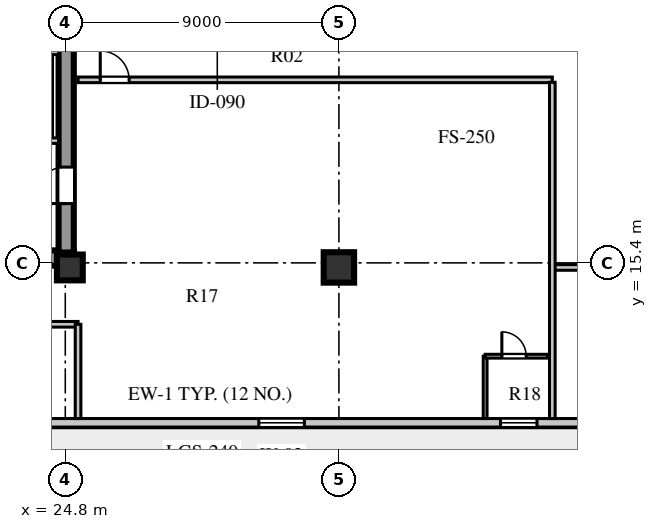
"""IFC4 building model, lengths in metres.
Left out: names, types, materials, properties, quantities, classifications, styles, units other than length and angle.
Written with IfcOpenShell. Run it as: python <this file> out.ifc"""

import sys

from ifc_helpers import new_model, si_unit, direction, frame, frame_2d, origin, origin_2d, place, context, subcontext, project, spatial, rectangle, extrude, element, fill, save


model = new_model("IFC4")
c1 = context("Model", 3, precision=1e-05, world=origin(), true_north=direction((0.0, 1.0)))
c2 = subcontext(c1, "Body", "Model", "MODEL_VIEW")
j1 = project(units=[si_unit("LENGTHUNIT", "METRE"), si_unit("PLANEANGLEUNIT", "RADIAN")], contexts=[c1])
p1 = place(None, origin())
s1 = spatial("IfcSite", under=j1, at=p1, CompositionType="ELEMENT")
p2 = place(p1, origin())
s2 = spatial("IfcBuilding", under=s1, at=p2, CompositionType="ELEMENT")
p3 = place(p2, frame((0.0, 0.0, 150.2)))
s3 = spatial("IfcBuildingStorey", under=s2, at=p3, CompositionType="ELEMENT", Elevation=150.2)
p4 = place(p3, frame((15.4, 15.56, 0.0), z_axis=(0.0, 0.0, 1.0), x_axis=(1.0, 0.0, 0.0)))
e1 = element("IfcWall", 1, at=p4, inside=s3, PredefinedType="SHEAR", context=c2, shape_type="SweptSolid", body=[
    extrude(rectangle(XDim=9.68, YDim=0.5, at=frame_2d((4.84, 0.0))), origin(), (0.0, 0.0, 1.0), 3.55),
])
p5 = place(p3, frame((24.83, 15.74, 0.0), z_axis=(0.0, 0.0, 1.0), x_axis=(0.0, 1.0, 0.0)))
e2 = element("IfcWall", 2, at=p5, inside=s3, PredefinedType="SHEAR", context=c2, shape_type="SweptSolid", body=[
    extrude(rectangle(XDim=25.76, YDim=0.5, at=frame_2d((12.88, 0.0))), origin(), (0.0, 0.0, 1.0), 3.55),
])
p6 = place(p5, frame((1.61, 0.0, 0.0)))
e3 = element("IfcOpeningElement", 3, at=p6, cuts=e2, PredefinedType="OPENING", context=c2, shape_type="SweptSolid", body=[
    extrude(rectangle(XDim=1.2, YDim=2.1, at=frame_2d((0.6, 1.05))), frame((0.0, 0.26, 0.0), z_axis=(0.0, -1.0, 0.0), x_axis=(1.0, 0.0, 0.0)), (0.0, 0.0, 1.0), 0.52),
])
p7 = place(p5, frame((6.78, 0.0, 0.0)))
e4 = element("IfcOpeningElement", 4, at=p7, cuts=e2, PredefinedType="OPENING", context=c2, shape_type="SweptSolid", body=[
    extrude(rectangle(XDim=0.85, YDim=2.06, at=frame_2d((0.425, 1.03))), frame((0.0, 0.26, 0.0), z_axis=(0.0, -1.0, 0.0), x_axis=(1.0, 0.0, 0.0)), (0.0, 0.0, 1.0), 0.52),
])
p8 = place(p5, frame((12.11, 0.0, 0.0)))
e5 = element("IfcOpeningElement", 5, at=p8, cuts=e2, PredefinedType="OPENING", context=c2, shape_type="SweptSolid", body=[
    extrude(rectangle(XDim=1.5, YDim=2.12, at=frame_2d((0.75, 1.06))), frame((0.0, 0.26, 0.0), z_axis=(0.0, -1.0, 0.0), x_axis=(1.0, 0.0, 0.0)), (0.0, 0.0, 1.0), 0.52),
])
p9 = place(p5, frame((20.11, 0.0, 0.0)))
e6 = element("IfcOpeningElement", 6, at=p9, cuts=e2, PredefinedType="OPENING", context=c2, shape_type="SweptSolid", body=[
    extrude(rectangle(XDim=1.2, YDim=2.12, at=frame_2d((0.6, 1.06))), frame((0.0, 0.26, 0.0), z_axis=(0.0, -1.0, 0.0), x_axis=(1.0, 0.0, 0.0)), (0.0, 0.0, 1.0), 0.52),
])
p10 = place(p5, frame((24.01, 0.0, 0.0)))
e7 = element("IfcOpeningElement", 7, at=p10, cuts=e2, PredefinedType="OPENING", context=c2, shape_type="SweptSolid", body=[
    extrude(rectangle(XDim=0.95, YDim=2.1, at=frame_2d((0.475, 1.05))), frame((0.0, 0.26, 0.0), z_axis=(0.0, -1.0, 0.0), x_axis=(1.0, 0.0, 0.0)), (0.0, 0.0, 1.0), 0.52),
])
p11 = place(p3, frame((24.95, 15.25, 0.0), z_axis=(0.0, 0.0, 1.0), x_axis=(1.0, 0.0, 0.0)))
e8 = element("IfcColumn", 8, at=p11, inside=s3, PredefinedType="COLUMN", context=c2, shape_type="SweptSolid", body=[
    extrude(rectangle(XDim=0.85, YDim=0.85, at=origin_2d()), origin(), (0.0, 0.0, 1.0), 3.55),
])
p12 = place(p3, frame((33.8, 15.25, 0.0), z_axis=(0.0, 0.0, 1.0), x_axis=(1.0, 0.0, 0.0)))
e9 = element("IfcColumn", 9, at=p12, inside=s3, PredefinedType="COLUMN", context=c2, shape_type="SweptSolid", body=[
    extrude(rectangle(XDim=1.0, YDim=1.0, at=origin_2d()), origin(), (0.0, 0.0, 1.0), 3.55),
])
p13 = place(p3, frame((13.25, 10.14, 0.0), z_axis=(0.0, 0.0, 1.0), x_axis=(1.0, 0.0, 0.0)))
e10 = element("IfcWall", 10, at=p13, inside=s3, PredefinedType="STANDARD", context=c2, shape_type="SweptSolid", body=[
    extrude(rectangle(XDim=32.1, YDim=0.28, at=frame_2d((16.05, 0.0))), origin(), (0.0, 0.0, 1.0), 3.55),
])
p14 = place(p13, frame((0.95, 0.0, 0.0)))
e11 = element("IfcOpeningElement", 11, at=p14, cuts=e10, PredefinedType="OPENING", context=c2, shape_type="SweptSolid", body=[
    extrude(rectangle(XDim=1.0, YDim=2.05, at=frame_2d((0.5, 1.025))), frame((0.0, 0.15, 0.0), z_axis=(0.0, -1.0, 0.0), x_axis=(1.0, 0.0, 0.0)), (0.0, 0.0, 1.0), 0.3),
])
p15 = place(p13, frame((6.03, 0.0, 0.8)))
e12 = element("IfcOpeningElement", 12, at=p15, cuts=e10, PredefinedType="OPENING", context=c2, shape_type="SweptSolid", body=[
    extrude(rectangle(XDim=1.8, YDim=2.0, at=frame_2d((0.9, 1.0))), frame((0.0, 0.15, 0.0), z_axis=(0.0, -1.0, 0.0), x_axis=(1.0, 0.0, 0.0)), (0.0, 0.0, 1.0), 0.3),
])
p16 = place(p13, frame((17.915, 0.0, 0.8)))
e13 = element("IfcOpeningElement", 13, at=p16, cuts=e10, PredefinedType="OPENING", context=c2, shape_type="SweptSolid", body=[
    extrude(rectangle(XDim=1.5, YDim=2.0, at=frame_2d((0.75, 1.0))), frame((0.0, 0.15, 0.0), z_axis=(0.0, -1.0, 0.0), x_axis=(1.0, 0.0, 0.0)), (0.0, 0.0, 1.0), 0.3),
])
p17 = place(p13, frame((25.865, 0.0, 0.8)))
e14 = element("IfcOpeningElement", 14, at=p17, cuts=e10, PredefinedType="OPENING", context=c2, shape_type="SweptSolid", body=[
    extrude(rectangle(XDim=1.2, YDim=1.75, at=frame_2d((0.6, 0.875))), frame((0.0, 0.15, 0.0), z_axis=(0.0, -1.0, 0.0), x_axis=(1.0, 0.0, 0.0)), (0.0, 0.0, 1.0), 0.3),
])
p18 = place(p13, frame((28.58, 0.0, 0.8)))
e15 = element("IfcOpeningElement", 15, at=p18, cuts=e10, PredefinedType="OPENING", context=c2, shape_type="SweptSolid", body=[
    extrude(rectangle(XDim=2.4, YDim=2.05, at=frame_2d((1.2, 1.025))), frame((0.0, 0.15, 0.0), z_axis=(0.0, -1.0, 0.0), x_axis=(1.0, 0.0, 0.0)), (0.0, 0.0, 1.0), 0.3),
])
p19 = place(p3, frame((19.64, 19.42, 0.0), z_axis=(0.0, 0.0, 1.0), x_axis=(1.0, 0.0, 0.0)))
e16 = element("IfcWall", 16, at=p19, inside=s3, PredefinedType="SOLIDWALL", context=c2, shape_type="SweptSolid", body=[
    extrude(rectangle(XDim=4.94, YDim=0.18, at=frame_2d((2.47, 0.0))), origin(), (0.0, 0.0, 1.0), 3.55),
])
p20 = place(p19, frame((0.72, 0.0, 0.0)))
e17 = element("IfcOpeningElement", 17, at=p20, cuts=e16, PredefinedType="OPENING", context=c2, shape_type="SweptSolid", body=[
    extrude(rectangle(XDim=1.1, YDim=2.1, at=frame_2d((0.55, 1.05))), frame((0.0, 0.1, 0.0), z_axis=(0.0, -1.0, 0.0), x_axis=(1.0, 0.0, 0.0)), (0.0, 0.0, 1.0), 0.2),
])
p21 = place(p19, frame((3.02, 0.0, 0.0)))
e18 = element("IfcOpeningElement", 18, at=p21, cuts=e16, PredefinedType="OPENING", context=c2, shape_type="SweptSolid", body=[
    extrude(rectangle(XDim=1.1, YDim=2.1, at=frame_2d((0.55, 1.05))), frame((0.0, 0.1, 0.0), z_axis=(0.0, -1.0, 0.0), x_axis=(1.0, 0.0, 0.0)), (0.0, 0.0, 1.0), 0.2),
])
p22 = place(p3, frame((19.64, 22.34, 0.0), z_axis=(0.0, 0.0, 1.0), x_axis=(1.0, 0.0, 0.0)))
e19 = element("IfcWall", 19, at=p22, inside=s3, PredefinedType="SOLIDWALL", context=c2, shape_type="SweptSolid", body=[
    extrude(rectangle(XDim=4.94, YDim=0.18, at=frame_2d((2.47, 0.0))), origin(), (0.0, 0.0, 1.0), 3.55),
])
p23 = place(p3, frame((25.22, 21.42, 0.0), z_axis=(0.0, 0.0, 1.0), x_axis=(1.0, 0.0, 0.0)))
e20 = element("IfcWall", 20, at=p23, inside=s3, PredefinedType="SOLIDWALL", context=c2, shape_type="SweptSolid", body=[
    extrude(rectangle(XDim=15.6, YDim=0.185, at=frame_2d((7.8, 0.0))), origin(), (0.0, 0.0, 1.0), 3.15),
])
p24 = place(p23, frame((0.73, 0.0, 0.0)))
e21 = element("IfcOpeningElement", 21, at=p24, cuts=e20, PredefinedType="OPENING", context=c2, shape_type="SweptSolid", body=[
    extrude(rectangle(XDim=0.95, YDim=2.1, at=frame_2d((0.475, 1.05))), frame((0.0, 0.103, 0.0), z_axis=(0.0, -1.0, 0.0), x_axis=(1.0, 0.0, 0.0)), (0.0, 0.0, 1.0), 0.205),
])
p25 = place(p3, frame((40.82, 15.25, 0.0), z_axis=(0.0, 0.0, 1.0), x_axis=(1.0, 0.0, 0.0)))
e22 = element("IfcWall", 22, at=p25, inside=s3, PredefinedType="SOLIDWALL", context=c2, shape_type="SweptSolid", body=[
    extrude(rectangle(XDim=7.3, YDim=0.185, at=frame_2d((3.65, 0.0))), origin(), (0.0, 0.0, 1.0), 2.9),
])
p26 = place(p3, frame((13.59, 13.38, 0.0), z_axis=(0.0, 0.0, 1.0), x_axis=(1.0, 0.0, 0.0)))
e23 = element("IfcWall", 23, at=p26, inside=s3, PredefinedType="SOLIDWALL", context=c2, shape_type="SweptSolid", body=[
    extrude(rectangle(XDim=11.63, YDim=0.185, at=frame_2d((5.815, 0.0))), origin(), (0.0, 0.0, 1.0), 3.55),
])
p27 = place(p26, frame((4.56, 0.0, 0.0)))
e24 = element("IfcOpeningElement", 24, at=p27, cuts=e23, PredefinedType="OPENING", context=c2, shape_type="SweptSolid", body=[
    extrude(rectangle(XDim=1.0, YDim=2.08, at=frame_2d((0.5, 1.04))), frame((0.0, 0.103, 0.0), z_axis=(0.0, -1.0, 0.0), x_axis=(1.0, 0.0, 0.0)), (0.0, 0.0, 1.0), 0.205),
])
p28 = place(p3, frame((25.22, 10.28, 0.0), z_axis=(0.0, 0.0, 1.0), x_axis=(0.0, 1.0, 0.0)))
e25 = element("IfcWall", 25, at=p28, inside=s3, PredefinedType="SOLIDWALL", context=c2, shape_type="SweptSolid", body=[
    extrude(rectangle(XDim=3.1, YDim=0.185, at=frame_2d((1.55, 0.0))), origin(), (0.0, 0.0, 1.0), 3.05),
])
p29 = place(p3, frame((40.82, 10.28, 0.0), z_axis=(0.0, 0.0, 1.0), x_axis=(0.0, 1.0, 0.0)))
e26 = element("IfcWall", 26, at=p29, inside=s3, PredefinedType="SOLIDWALL", context=c2, shape_type="SweptSolid", body=[
    extrude(rectangle(XDim=11.06, YDim=0.185, at=frame_2d((5.53, 0.0))), origin(), (0.0, 0.0, 1.0), 3.55),
])
p30 = place(p3, frame((38.61, 10.28, 0.0), z_axis=(0.0, 0.0, 1.0), x_axis=(0.0, 1.0, 0.0)))
e27 = element("IfcWall", 27, at=p30, inside=s3, PredefinedType="PLUMBINGWALL", context=c2, shape_type="SweptSolid", body=[
    extrude(rectangle(XDim=2.05, YDim=0.125, at=frame_2d((1.025, 0.0))), origin(), (0.0, 0.0, 1.0), 3.55),
])
p31 = place(p3, frame((38.61, 12.33, 0.0), z_axis=(0.0, 0.0, 1.0), x_axis=(1.0, 0.0, 0.0)))
e28 = element("IfcWall", 28, at=p31, inside=s3, PredefinedType="PLUMBINGWALL", context=c2, shape_type="SweptSolid", body=[
    extrude(rectangle(XDim=2.05, YDim=0.125, at=frame_2d((1.025, 0.0))), origin(), (0.0, 0.0, 1.0), 3.55),
])
p32 = place(p31, frame((0.55, 0.0, 0.0)))
e29 = element("IfcOpeningElement", 29, at=p32, cuts=e28, PredefinedType="OPENING", context=c2, shape_type="SweptSolid", body=[
    extrude(rectangle(XDim=0.8, YDim=2.05, at=frame_2d((0.4, 1.025))), frame((0.0, 0.073, 0.0), z_axis=(0.0, -1.0, 0.0), x_axis=(1.0, 0.0, 0.0)), (0.0, 0.0, 1.0), 0.145),
])
p33 = place(p16, origin())
e30 = element("IfcWindow", 30, at=p33, inside=s3, PartitioningType="SINGLE_PANEL", PredefinedType="WINDOW", context=c2, shape_type="SweptSolid", body=[
    extrude(rectangle(XDim=1.5, YDim=2.0, at=frame_2d((0.75, 1.0))), frame((0.0, 0.03, 0.0), z_axis=(0.0, -1.0, 0.0), x_axis=(1.0, 0.0, 0.0)), (0.0, 0.0, 1.0), 0.06),
])
fill(e13, e30)
p34 = place(p17, origin())
e31 = element("IfcWindow", 31, at=p34, inside=s3, PartitioningType="SINGLE_PANEL", PredefinedType="WINDOW", context=c2, shape_type="SweptSolid", body=[
    extrude(rectangle(XDim=1.2, YDim=1.75, at=frame_2d((0.6, 0.875))), frame((0.0, 0.03, 0.0), z_axis=(0.0, -1.0, 0.0), x_axis=(1.0, 0.0, 0.0)), (0.0, 0.0, 1.0), 0.06),
])
fill(e14, e31)
p35 = place(p6, frame((1.2, 0.0, 0.0), z_axis=(0.0, 0.0, 1.0), x_axis=(-1.0, 0.0, 0.0)))
e32 = element("IfcDoor", 32, at=p35, inside=s3, OperationType="SINGLE_SWING_RIGHT", PredefinedType="DOOR", context=c2, shape_type="SweptSolid", body=[
    extrude(rectangle(XDim=1.2, YDim=2.1, at=frame_2d((0.6, 1.05))), frame((0.0, 0.025, 0.0), z_axis=(0.0, -1.0, 0.0), x_axis=(1.0, 0.0, 0.0)), (0.0, 0.0, 1.0), 0.05),
])
fill(e3, e32)
p36 = place(p24, frame((0.95, 0.0, 0.0), z_axis=(0.0, 0.0, 1.0), x_axis=(-1.0, 0.0, 0.0)))
e33 = element("IfcDoor", 33, at=p36, inside=s3, OperationType="SINGLE_SWING_RIGHT", PredefinedType="DOOR", context=c2, shape_type="SweptSolid", body=[
    extrude(rectangle(XDim=0.95, YDim=2.1, at=frame_2d((0.475, 1.05))), frame((0.0, 0.025, 0.0), z_axis=(0.0, -1.0, 0.0), x_axis=(1.0, 0.0, 0.0)), (0.0, 0.0, 1.0), 0.05),
])
fill(e21, e33)
p37 = place(p32, origin())
e34 = element("IfcDoor", 34, at=p37, inside=s3, OperationType="SINGLE_SWING_LEFT", PredefinedType="DOOR", context=c2, shape_type="SweptSolid", body=[
    extrude(rectangle(XDim=0.8, YDim=2.05, at=frame_2d((0.4, 1.025))), frame((0.0, 0.025, 0.0), z_axis=(0.0, -1.0, 0.0), x_axis=(1.0, 0.0, 0.0)), (0.0, 0.0, 1.0), 0.05),
])
fill(e29, e34)
save(model, sys.argv[1])
